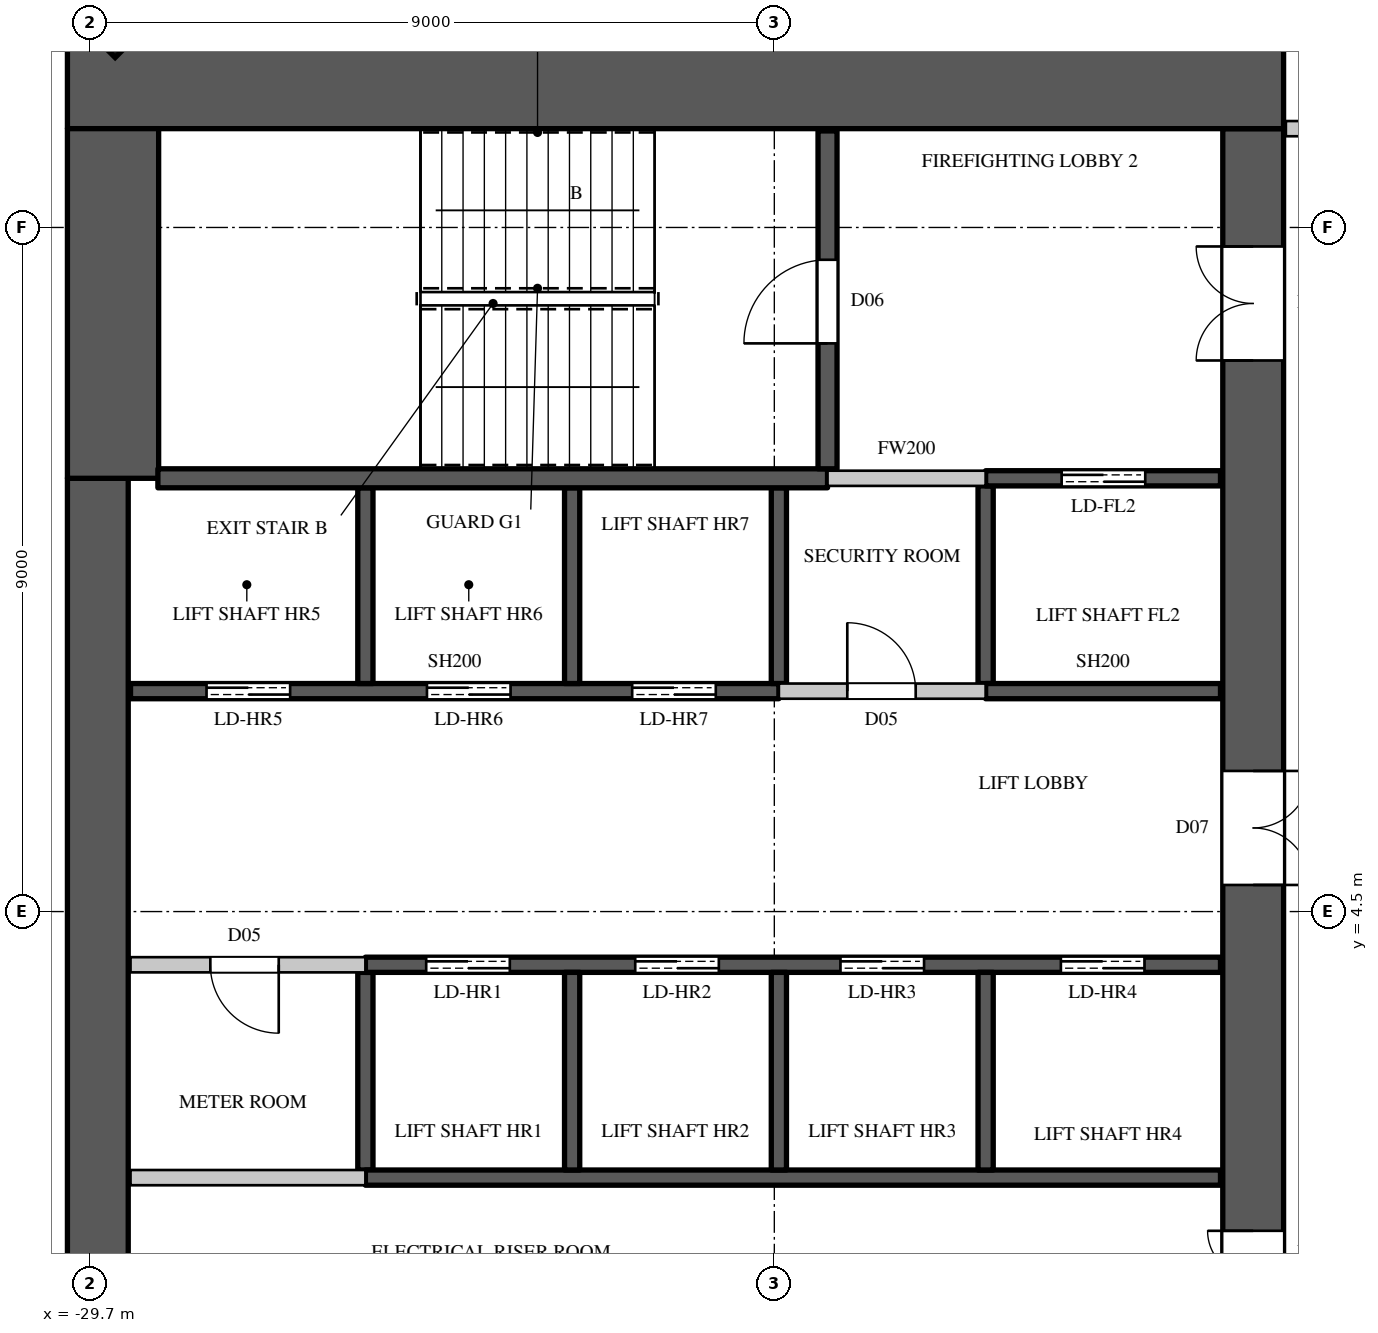
"""IFC4 building model, lengths in metres.
Left out: names, types, materials, properties, quantities, classifications, styles, units other than length and angle.
Written with IfcOpenShell. Run it as: python <this file> out.ifc"""

import sys

from ifc_helpers import new_model, si_unit, direction, frame, frame_2d, origin, origin_2d, place, context, subcontext, project, spatial, rectangle, extrude, element, fill, save


model = new_model("IFC4")
c1 = context("Model", 3, precision=1e-05, world=origin(), true_north=direction((0.0, 1.0)))
c2 = subcontext(c1, "Body", "Model", "MODEL_VIEW")
j1 = project(units=[si_unit("LENGTHUNIT", "METRE"), si_unit("PLANEANGLEUNIT", "RADIAN")], contexts=[c1])
p1 = place(None, origin())
s1 = spatial("IfcSite", under=j1, at=p1, CompositionType="ELEMENT")
p2 = place(p1, origin())
s2 = spatial("IfcBuilding", under=s1, at=p2, CompositionType="ELEMENT")
p3 = place(p2, frame((0.0, 0.0, 213.8)))
s3 = spatial("IfcBuildingStorey", under=s2, at=p3, CompositionType="ELEMENT", Elevation=213.8)
p4 = place(p3, frame((-29.443, 16.443, 0.0), z_axis=(0.0, 0.0, 1.0), x_axis=(-0.707106781187, -0.707106781187, 0.0)))
e1 = element("IfcColumn", 1, at=p4, inside=s3, PredefinedType="COLUMN", context=c2, shape_type="SweptSolid", body=[
    extrude(rectangle(XDim=0.9, YDim=1.1, at=origin_2d()), origin(), (0.0, 0.0, 1.0), 4.1),
])
p5 = place(p3, frame((-30.0, 15.4, 0.0), z_axis=(0.0, 0.0, 1.0), x_axis=(1.0, 0.0, 0.0)))
e2 = element("IfcWall", 2, at=p5, inside=s3, PredefinedType="SHEAR", context=c2, shape_type="SweptSolid", body=[
    extrude(rectangle(XDim=16.0, YDim=1.2, at=frame_2d((8.0, 0.0))), origin(), (0.0, 0.0, 1.0), 4.1),
])
p6 = place(p3, frame((-14.4, -14.8, 0.0), z_axis=(0.0, 0.0, 1.0), x_axis=(0.0, 1.0, 0.0)))
e3 = element("IfcWall", 3, at=p6, inside=s3, PredefinedType="SHEAR", context=c2, shape_type="SweptSolid", body=[
    extrude(rectangle(XDim=29.6, YDim=0.8, at=frame_2d((14.8, 0.0))), origin(), (0.0, 0.0, 1.0), 4.1),
])
p7 = place(p6, frame((1.55, 0.0, 0.0)))
e4 = element("IfcOpeningElement", 4, at=p7, cuts=e3, PredefinedType="OPENING", context=c2, shape_type="SweptSolid", body=[
    extrude(rectangle(XDim=1.5, YDim=2.4, at=frame_2d((0.75, 1.2))), frame((0.0, 0.41, 0.0), z_axis=(0.0, -1.0, 0.0), x_axis=(1.0, 0.0, 0.0)), (0.0, 0.0, 1.0), 0.82),
])
p8 = place(p6, frame((26.55, 0.0, 0.0)))
e5 = element("IfcOpeningElement", 5, at=p8, cuts=e3, PredefinedType="OPENING", context=c2, shape_type="SweptSolid", body=[
    extrude(rectangle(XDim=1.5, YDim=2.4, at=frame_2d((0.75, 1.2))), frame((0.0, 0.41, 0.0), z_axis=(0.0, -1.0, 0.0), x_axis=(1.0, 0.0, 0.0)), (0.0, 0.0, 1.0), 0.82),
])
p9 = place(p6, frame((8.45, 0.0, 0.0)))
e6 = element("IfcOpeningElement", 6, at=p9, cuts=e3, PredefinedType="OPENING", context=c2, shape_type="SweptSolid", body=[
    extrude(rectangle(XDim=1.5, YDim=2.4, at=frame_2d((0.75, 1.2))), frame((0.0, 0.41, 0.0), z_axis=(0.0, -1.0, 0.0), x_axis=(1.0, 0.0, 0.0)), (0.0, 0.0, 1.0), 0.82),
])
p10 = place(p6, frame((19.65, 0.0, 0.0)))
e7 = element("IfcOpeningElement", 7, at=p10, cuts=e3, PredefinedType="OPENING", context=c2, shape_type="SweptSolid", body=[
    extrude(rectangle(XDim=1.5, YDim=2.4, at=frame_2d((0.75, 1.2))), frame((0.0, 0.41, 0.0), z_axis=(0.0, -1.0, 0.0), x_axis=(1.0, 0.0, 0.0)), (0.0, 0.0, 1.0), 0.82),
])
p11 = place(p6, frame((14.5, 0.0, 0.0)))
e8 = element("IfcOpeningElement", 8, at=p11, cuts=e3, PredefinedType="OPENING", context=c2, shape_type="SweptSolid", body=[
    extrude(rectangle(XDim=0.6, YDim=2.0, at=frame_2d((0.3, 1.0))), frame((0.0, 0.41, 0.0), z_axis=(0.0, -1.0, 0.0), x_axis=(1.0, 0.0, 0.0)), (0.0, 0.0, 1.0), 0.82),
])
p12 = place(p3, frame((-29.6, -10.2, 0.0), z_axis=(0.0, 0.0, 1.0), x_axis=(0.0, 1.0, 0.0)))
e9 = element("IfcWall", 9, at=p12, inside=s3, PredefinedType="SHEAR", context=c2, shape_type="SweptSolid", body=[
    extrude(rectangle(XDim=20.4, YDim=0.8, at=frame_2d((10.2, 0.0))), origin(), (0.0, 0.0, 1.0), 4.1),
])
p13 = place(p3, frame((-29.4, 10.2, 0.0), z_axis=(0.0, 0.0, 1.0), x_axis=(0.0, 1.0, 0.0)))
e10 = element("IfcWall", 10, at=p13, inside=s3, PredefinedType="SHEAR", context=c2, shape_type="SweptSolid", body=[
    extrude(rectangle(XDim=4.6, YDim=1.2, at=frame_2d((2.3, 0.0))), origin(), (0.0, 0.0, 1.0), 4.1),
])
p14 = place(p3, frame((-20.64, 7.4, 0.0), z_axis=(0.0, 0.0, 1.0), x_axis=(1.0, 0.0, 0.0)))
e11 = element("IfcWall", 11, at=p14, inside=s3, PredefinedType="PARTITIONING", context=c2, shape_type="SweptSolid", body=[
    extrude(rectangle(XDim=2.72, YDim=0.2, at=frame_2d((1.36, 0.0))), origin(), (0.0, 0.0, 1.0), 3.8),
])
p15 = place(p14, frame((0.9, 0.0, 0.0)))
e12 = element("IfcOpeningElement", 12, at=p15, cuts=e11, PredefinedType="OPENING", context=c2, shape_type="SweptSolid", body=[
    extrude(rectangle(XDim=0.9, YDim=2.2, at=frame_2d((0.45, 1.1))), frame((0.0, 0.11, 0.0), z_axis=(0.0, -1.0, 0.0), x_axis=(1.0, 0.0, 0.0)), (0.0, 0.0, 1.0), 0.22),
])
p16 = place(p3, frame((-20.0, 10.2, 0.0), z_axis=(0.0, 0.0, 1.0), x_axis=(1.0, 0.0, 0.0)))
e13 = element("IfcWall", 13, at=p16, inside=s3, PredefinedType="PARTITIONING", context=c2, shape_type="SweptSolid", body=[
    extrude(rectangle(XDim=2.08, YDim=0.2, at=frame_2d((1.04, 0.0))), origin(), (0.0, 0.0, 1.0), 3.8),
])
p17 = place(p3, frame((-13.97, 14.8, 0.0), z_axis=(0.0, 0.0, 1.0), x_axis=(1.0, 0.0, 0.0)))
e14 = element("IfcWall", 14, at=p17, inside=s3, PredefinedType="PARTITIONING", context=c2, shape_type="SweptSolid", body=[
    extrude(rectangle(XDim=2.87, YDim=0.2, at=frame_2d((1.435, 0.0))), origin(), (0.0, 0.0, 1.0), 3.8),
])
p18 = place(p3, frame((-29.17, 1.0, 0.0), z_axis=(0.0, 0.0, 1.0), x_axis=(1.0, 0.0, 0.0)))
e15 = element("IfcWall", 15, at=p18, inside=s3, PredefinedType="PARTITIONING", context=c2, shape_type="SweptSolid", body=[
    extrude(rectangle(XDim=3.09, YDim=0.2, at=frame_2d((1.545, 0.0))), origin(), (0.0, 0.0, 1.0), 3.8),
])
p19 = place(p3, frame((-29.17, 3.8, 0.0), z_axis=(0.0, 0.0, 1.0), x_axis=(1.0, 0.0, 0.0)))
e16 = element("IfcWall", 16, at=p19, inside=s3, PredefinedType="PARTITIONING", context=c2, shape_type="SweptSolid", body=[
    extrude(rectangle(XDim=3.09, YDim=0.2, at=frame_2d((1.545, 0.0))), origin(), (0.0, 0.0, 1.0), 3.8),
])
p20 = place(p19, frame((1.05, 0.0, 0.0)))
e17 = element("IfcOpeningElement", 17, at=p20, cuts=e16, PredefinedType="OPENING", context=c2, shape_type="SweptSolid", body=[
    extrude(rectangle(XDim=0.9, YDim=2.2, at=frame_2d((0.45, 1.1))), frame((0.0, 0.11, 0.0), z_axis=(0.0, -1.0, 0.0), x_axis=(1.0, 0.0, 0.0)), (0.0, 0.0, 1.0), 0.22),
])
p21 = place(p3, frame((-29.17, 7.4, 0.0), z_axis=(0.0, 0.0, 1.0), x_axis=(1.0, 0.0, 0.0)))
e18 = element("IfcWall", 18, at=p21, inside=s3, PredefinedType="SHEAR", context=c2, shape_type="SweptSolid", body=[
    extrude(rectangle(XDim=8.53, YDim=0.2, at=frame_2d((4.265, 0.0))), origin(), (0.0, 0.0, 1.0), 3.8),
])
p22 = place(p21, frame((1.0, 0.0, 0.0)))
e19 = element("IfcOpeningElement", 19, at=p22, cuts=e18, PredefinedType="OPENING", context=c2, shape_type="SweptSolid", body=[
    extrude(rectangle(XDim=1.1, YDim=2.2, at=frame_2d((0.55, 1.1))), frame((0.0, 0.11, 0.0), z_axis=(0.0, -1.0, 0.0), x_axis=(1.0, 0.0, 0.0)), (0.0, 0.0, 1.0), 0.22),
])
p23 = place(p21, frame((3.9, 0.0, 0.0)))
e20 = element("IfcOpeningElement", 20, at=p23, cuts=e18, PredefinedType="OPENING", context=c2, shape_type="SweptSolid", body=[
    extrude(rectangle(XDim=1.1, YDim=2.2, at=frame_2d((0.55, 1.1))), frame((0.0, 0.11, 0.0), z_axis=(0.0, -1.0, 0.0), x_axis=(1.0, 0.0, 0.0)), (0.0, 0.0, 1.0), 0.22),
])
p24 = place(p21, frame((6.6, 0.0, 0.0)))
e21 = element("IfcOpeningElement", 21, at=p24, cuts=e18, PredefinedType="OPENING", context=c2, shape_type="SweptSolid", body=[
    extrude(rectangle(XDim=1.1, YDim=2.2, at=frame_2d((0.55, 1.1))), frame((0.0, 0.11, 0.0), z_axis=(0.0, -1.0, 0.0), x_axis=(1.0, 0.0, 0.0)), (0.0, 0.0, 1.0), 0.22),
])
p25 = place(p3, frame((-26.08, 1.1, 0.0), z_axis=(0.0, 0.0, 1.0), x_axis=(0.0, 1.0, 0.0)))
e22 = element("IfcWall", 22, at=p25, inside=s3, PredefinedType="SHEAR", context=c2, shape_type="SweptSolid", body=[
    extrude(rectangle(XDim=2.6, YDim=0.2, at=frame_2d((1.3, 0.0))), origin(), (0.0, 0.0, 1.0), 3.8),
])
p26 = place(p3, frame((-26.08, 1.0, 0.0), z_axis=(0.0, 0.0, 1.0), x_axis=(1.0, 0.0, 0.0)))
e23 = element("IfcWall", 23, at=p26, inside=s3, PredefinedType="SHEAR", context=c2, shape_type="SweptSolid", body=[
    extrude(rectangle(XDim=11.25, YDim=0.2, at=frame_2d((5.625, 0.0))), origin(), (0.0, 0.0, 1.0), 3.8),
])
p27 = place(p3, frame((-26.08, 3.8, 0.0), z_axis=(0.0, 0.0, 1.0), x_axis=(1.0, 0.0, 0.0)))
e24 = element("IfcWall", 24, at=p27, inside=s3, PredefinedType="SHEAR", context=c2, shape_type="SweptSolid", body=[
    extrude(rectangle(XDim=11.25, YDim=0.2, at=frame_2d((5.625, 0.0))), origin(), (0.0, 0.0, 1.0), 3.8),
])
p28 = place(p27, frame((0.8, 0.0, 0.0)))
e25 = element("IfcOpeningElement", 25, at=p28, cuts=e24, PredefinedType="OPENING", context=c2, shape_type="SweptSolid", body=[
    extrude(rectangle(XDim=1.1, YDim=2.2, at=frame_2d((0.55, 1.1))), frame((0.0, 0.11, 0.0), z_axis=(0.0, -1.0, 0.0), x_axis=(1.0, 0.0, 0.0)), (0.0, 0.0, 1.0), 0.22),
])
p29 = place(p27, frame((3.55, 0.0, 0.0)))
e26 = element("IfcOpeningElement", 26, at=p29, cuts=e24, PredefinedType="OPENING", context=c2, shape_type="SweptSolid", body=[
    extrude(rectangle(XDim=1.1, YDim=2.2, at=frame_2d((0.55, 1.1))), frame((0.0, 0.11, 0.0), z_axis=(0.0, -1.0, 0.0), x_axis=(1.0, 0.0, 0.0)), (0.0, 0.0, 1.0), 0.22),
])
p30 = place(p27, frame((6.25, 0.0, 0.0)))
e27 = element("IfcOpeningElement", 27, at=p30, cuts=e24, PredefinedType="OPENING", context=c2, shape_type="SweptSolid", body=[
    extrude(rectangle(XDim=1.1, YDim=2.2, at=frame_2d((0.55, 1.1))), frame((0.0, 0.11, 0.0), z_axis=(0.0, -1.0, 0.0), x_axis=(1.0, 0.0, 0.0)), (0.0, 0.0, 1.0), 0.22),
])
p31 = place(p27, frame((9.15, 0.0, 0.0)))
e28 = element("IfcOpeningElement", 28, at=p31, cuts=e24, PredefinedType="OPENING", context=c2, shape_type="SweptSolid", body=[
    extrude(rectangle(XDim=1.1, YDim=2.2, at=frame_2d((0.55, 1.1))), frame((0.0, 0.11, 0.0), z_axis=(0.0, -1.0, 0.0), x_axis=(1.0, 0.0, 0.0)), (0.0, 0.0, 1.0), 0.22),
])
p32 = place(p3, frame((-26.08, 7.5, 0.0), z_axis=(0.0, 0.0, 1.0), x_axis=(0.0, 1.0, 0.0)))
e29 = element("IfcWall", 29, at=p32, inside=s3, PredefinedType="SHEAR", context=c2, shape_type="SweptSolid", body=[
    extrude(rectangle(XDim=2.575, YDim=0.2, at=frame_2d((1.288, 0.0))), origin(), (0.0, 0.0, 1.0), 4.1),
])
p33 = place(p3, frame((-23.36, 1.1, 0.0), z_axis=(0.0, 0.0, 1.0), x_axis=(0.0, 1.0, 0.0)))
e30 = element("IfcWall", 30, at=p33, inside=s3, PredefinedType="SHEAR", context=c2, shape_type="SweptSolid", body=[
    extrude(rectangle(XDim=2.6, YDim=0.2, at=frame_2d((1.3, 0.0))), origin(), (0.0, 0.0, 1.0), 4.1),
])
p34 = place(p3, frame((-23.36, 7.5, 0.0), z_axis=(0.0, 0.0, 1.0), x_axis=(0.0, 1.0, 0.0)))
e31 = element("IfcWall", 31, at=p34, inside=s3, PredefinedType="SHEAR", context=c2, shape_type="SweptSolid", body=[
    extrude(rectangle(XDim=2.575, YDim=0.2, at=frame_2d((1.288, 0.0))), origin(), (0.0, 0.0, 1.0), 4.1),
])
p35 = place(p3, frame((-20.64, 1.1, 0.0), z_axis=(0.0, 0.0, 1.0), x_axis=(0.0, 1.0, 0.0)))
e32 = element("IfcWall", 32, at=p35, inside=s3, PredefinedType="SHEAR", context=c2, shape_type="SweptSolid", body=[
    extrude(rectangle(XDim=2.6, YDim=0.2, at=frame_2d((1.3, 0.0))), origin(), (0.0, 0.0, 1.0), 4.1),
])
p36 = place(p3, frame((-20.64, 7.5, 0.0), z_axis=(0.0, 0.0, 1.0), x_axis=(0.0, 1.0, 0.0)))
e33 = element("IfcWall", 33, at=p36, inside=s3, PredefinedType="SHEAR", context=c2, shape_type="SweptSolid", body=[
    extrude(rectangle(XDim=2.575, YDim=0.2, at=frame_2d((1.288, 0.0))), origin(), (0.0, 0.0, 1.0), 3.8),
])
p37 = place(p3, frame((-17.92, 1.1, 0.0), z_axis=(0.0, 0.0, 1.0), x_axis=(0.0, 1.0, 0.0)))
e34 = element("IfcWall", 34, at=p37, inside=s3, PredefinedType="SHEAR", context=c2, shape_type="SweptSolid", body=[
    extrude(rectangle(XDim=2.6, YDim=0.2, at=frame_2d((1.3, 0.0))), origin(), (0.0, 0.0, 1.0), 4.1),
])
p38 = place(p3, frame((-17.92, 7.5, 0.0), z_axis=(0.0, 0.0, 1.0), x_axis=(0.0, 1.0, 0.0)))
e35 = element("IfcWall", 35, at=p38, inside=s3, PredefinedType="SHEAR", context=c2, shape_type="SweptSolid", body=[
    extrude(rectangle(XDim=2.6, YDim=0.2, at=frame_2d((1.3, 0.0))), origin(), (0.0, 0.0, 1.0), 3.8),
])
p39 = place(p3, frame((-17.92, 7.4, 0.0), z_axis=(0.0, 0.0, 1.0), x_axis=(1.0, 0.0, 0.0)))
e36 = element("IfcWall", 36, at=p39, inside=s3, PredefinedType="SHEAR", context=c2, shape_type="SweptSolid", body=[
    extrude(rectangle(XDim=3.09, YDim=0.2, at=frame_2d((1.545, 0.0))), origin(), (0.0, 0.0, 1.0), 3.8),
])
p40 = place(p3, frame((-17.92, 10.2, 0.0), z_axis=(0.0, 0.0, 1.0), x_axis=(1.0, 0.0, 0.0)))
e37 = element("IfcWall", 37, at=p40, inside=s3, PredefinedType="SHEAR", context=c2, shape_type="SweptSolid", body=[
    extrude(rectangle(XDim=3.09, YDim=0.2, at=frame_2d((1.545, 0.0))), origin(), (0.0, 0.0, 1.0), 3.8),
])
p41 = place(p40, frame((1.0, 0.0, 0.0)))
e38 = element("IfcOpeningElement", 38, at=p41, cuts=e37, PredefinedType="OPENING", context=c2, shape_type="SweptSolid", body=[
    extrude(rectangle(XDim=1.1, YDim=2.2, at=frame_2d((0.55, 1.1))), frame((0.0, 0.11, 0.0), z_axis=(0.0, -1.0, 0.0), x_axis=(1.0, 0.0, 0.0)), (0.0, 0.0, 1.0), 0.22),
])
p42 = place(p3, frame((-28.81, 10.2, 0.0), z_axis=(0.0, 0.0, 1.0), x_axis=(1.0, 0.0, 0.0)))
e39 = element("IfcWall", 39, at=p42, inside=s3, PredefinedType="SHEAR", context=c2, shape_type="SweptSolid", body=[
    extrude(rectangle(XDim=8.81, YDim=0.25, at=frame_2d((4.405, 0.0))), origin(), (0.0, 0.0, 1.0), 3.8),
])
p43 = place(p3, frame((-20.0, 10.325, 0.0), z_axis=(0.0, 0.0, 1.0), x_axis=(0.0, 1.0, 0.0)))
e40 = element("IfcWall", 40, at=p43, inside=s3, PredefinedType="SHEAR", context=c2, shape_type="SweptSolid", body=[
    extrude(rectangle(XDim=4.445, YDim=0.25, at=frame_2d((2.223, 0.0))), origin(), (0.0, 0.0, 1.0), 3.8),
])
p44 = place(p43, frame((1.65, 0.0, 0.0)))
e41 = element("IfcOpeningElement", 41, at=p44, cuts=e40, PredefinedType="OPENING", context=c2, shape_type="SweptSolid", body=[
    extrude(rectangle(XDim=1.1, YDim=2.2, at=frame_2d((0.55, 1.1))), frame((0.0, 0.135, 0.0), z_axis=(0.0, -1.0, 0.0), x_axis=(1.0, 0.0, 0.0)), (0.0, 0.0, 1.0), 0.27),
])
p45 = place(p44, origin())
e42 = element("IfcDoor", 42, at=p45, inside=s3, OperationType="SINGLE_SWING_LEFT", PredefinedType="DOOR", context=c2, shape_type="SweptSolid", body=[
    extrude(rectangle(XDim=1.1, YDim=2.2, at=frame_2d((0.55, 1.1))), frame((0.0, 0.025, 0.0), z_axis=(0.0, -1.0, 0.0), x_axis=(1.0, 0.0, 0.0)), (0.0, 0.0, 1.0), 0.05),
])
fill(e41, e42)
p46 = place(p20, origin())
e43 = element("IfcDoor", 43, at=p46, inside=s3, OperationType="SINGLE_SWING_LEFT", PredefinedType="DOOR", context=c2, shape_type="SweptSolid", body=[
    extrude(rectangle(XDim=0.9, YDim=2.2, at=frame_2d((0.45, 1.1))), frame((0.0, 0.025, 0.0), z_axis=(0.0, -1.0, 0.0), x_axis=(1.0, 0.0, 0.0)), (0.0, 0.0, 1.0), 0.05),
])
fill(e17, e43)
p47 = place(p15, origin())
e44 = element("IfcDoor", 44, at=p47, inside=s3, OperationType="SINGLE_SWING_LEFT", PredefinedType="DOOR", context=c2, shape_type="SweptSolid", body=[
    extrude(rectangle(XDim=0.9, YDim=2.2, at=frame_2d((0.45, 1.1))), frame((0.0, 0.025, 0.0), z_axis=(0.0, -1.0, 0.0), x_axis=(1.0, 0.0, 0.0)), (0.0, 0.0, 1.0), 0.05),
])
fill(e12, e44)
p48 = place(p28, origin())
e45 = element("IfcDoor", 45, at=p48, inside=s3, OperationType="DOUBLE_DOOR_SLIDING", PredefinedType="DOOR", context=c2, shape_type="SweptSolid", body=[
    extrude(rectangle(XDim=1.1, YDim=2.2, at=frame_2d((0.55, 1.1))), frame((0.0, 0.025, 0.0), z_axis=(0.0, -1.0, 0.0), x_axis=(1.0, 0.0, 0.0)), (0.0, 0.0, 1.0), 0.05),
])
fill(e25, e45)
p49 = place(p29, origin())
e46 = element("IfcDoor", 46, at=p49, inside=s3, OperationType="DOUBLE_DOOR_SLIDING", PredefinedType="DOOR", context=c2, shape_type="SweptSolid", body=[
    extrude(rectangle(XDim=1.1, YDim=2.2, at=frame_2d((0.55, 1.1))), frame((0.0, 0.025, 0.0), z_axis=(0.0, -1.0, 0.0), x_axis=(1.0, 0.0, 0.0)), (0.0, 0.0, 1.0), 0.05),
])
fill(e26, e46)
p50 = place(p30, origin())
e47 = element("IfcDoor", 47, at=p50, inside=s3, OperationType="DOUBLE_DOOR_SLIDING", PredefinedType="DOOR", context=c2, shape_type="SweptSolid", body=[
    extrude(rectangle(XDim=1.1, YDim=2.2, at=frame_2d((0.55, 1.1))), frame((0.0, 0.025, 0.0), z_axis=(0.0, -1.0, 0.0), x_axis=(1.0, 0.0, 0.0)), (0.0, 0.0, 1.0), 0.05),
])
fill(e27, e47)
p51 = place(p31, origin())
e48 = element("IfcDoor", 48, at=p51, inside=s3, OperationType="DOUBLE_DOOR_SLIDING", PredefinedType="DOOR", context=c2, shape_type="SweptSolid", body=[
    extrude(rectangle(XDim=1.1, YDim=2.2, at=frame_2d((0.55, 1.1))), frame((0.0, 0.025, 0.0), z_axis=(0.0, -1.0, 0.0), x_axis=(1.0, 0.0, 0.0)), (0.0, 0.0, 1.0), 0.05),
])
fill(e28, e48)
p52 = place(p22, origin())
e49 = element("IfcDoor", 49, at=p52, inside=s3, OperationType="DOUBLE_DOOR_SLIDING", PredefinedType="DOOR", context=c2, shape_type="SweptSolid", body=[
    extrude(rectangle(XDim=1.1, YDim=2.2, at=frame_2d((0.55, 1.1))), frame((0.0, 0.025, 0.0), z_axis=(0.0, -1.0, 0.0), x_axis=(1.0, 0.0, 0.0)), (0.0, 0.0, 1.0), 0.05),
])
fill(e19, e49)
p53 = place(p23, origin())
e50 = element("IfcDoor", 50, at=p53, inside=s3, OperationType="DOUBLE_DOOR_SLIDING", PredefinedType="DOOR", context=c2, shape_type="SweptSolid", body=[
    extrude(rectangle(XDim=1.1, YDim=2.2, at=frame_2d((0.55, 1.1))), frame((0.0, 0.025, 0.0), z_axis=(0.0, -1.0, 0.0), x_axis=(1.0, 0.0, 0.0)), (0.0, 0.0, 1.0), 0.05),
])
fill(e20, e50)
p54 = place(p24, origin())
e51 = element("IfcDoor", 51, at=p54, inside=s3, OperationType="DOUBLE_DOOR_SLIDING", PredefinedType="DOOR", context=c2, shape_type="SweptSolid", body=[
    extrude(rectangle(XDim=1.1, YDim=2.2, at=frame_2d((0.55, 1.1))), frame((0.0, 0.025, 0.0), z_axis=(0.0, -1.0, 0.0), x_axis=(1.0, 0.0, 0.0)), (0.0, 0.0, 1.0), 0.05),
])
fill(e21, e51)
p55 = place(p41, origin())
e52 = element("IfcDoor", 52, at=p55, inside=s3, OperationType="DOUBLE_DOOR_SLIDING", PredefinedType="DOOR", context=c2, shape_type="SweptSolid", body=[
    extrude(rectangle(XDim=1.1, YDim=2.2, at=frame_2d((0.55, 1.1))), frame((0.0, 0.025, 0.0), z_axis=(0.0, -1.0, 0.0), x_axis=(1.0, 0.0, 0.0)), (0.0, 0.0, 1.0), 0.05),
])
fill(e38, e52)
p56 = place(p8, origin())
e53 = element("IfcDoor", 53, at=p56, inside=s3, OperationType="DOUBLE_DOOR_SINGLE_SWING", PredefinedType="DOOR", context=c2, shape_type="SweptSolid", body=[
    extrude(rectangle(XDim=1.5, YDim=2.4, at=frame_2d((0.75, 1.2))), frame((0.0, 0.395, 0.0), z_axis=(0.0, -1.0, 0.0), x_axis=(1.0, 0.0, 0.0)), (0.0, 0.0, 1.0), 0.05),
])
fill(e5, e53)
p57 = place(p10, origin())
e54 = element("IfcDoor", 54, at=p57, inside=s3, OperationType="DOUBLE_DOOR_SINGLE_SWING", PredefinedType="DOOR", context=c2, shape_type="SweptSolid", body=[
    extrude(rectangle(XDim=1.5, YDim=2.4, at=frame_2d((0.75, 1.2))), frame((0.0, -0.345, 0.0), z_axis=(0.0, -1.0, 0.0), x_axis=(1.0, 0.0, 0.0)), (0.0, 0.0, 1.0), 0.05),
])
fill(e7, e54)
p58 = place(p11, origin())
e55 = element("IfcDoor", 55, at=p58, inside=s3, OperationType="SINGLE_SWING_RIGHT", PredefinedType="DOOR", context=c2, shape_type="SweptSolid", body=[
    extrude(rectangle(XDim=0.6, YDim=2.0, at=frame_2d((0.3, 1.0))), frame((0.0, 0.395, 0.0), z_axis=(0.0, -1.0, 0.0), x_axis=(1.0, 0.0, 0.0)), (0.0, 0.0, 1.0), 0.05),
])
fill(e8, e55)
save(model, sys.argv[1])
